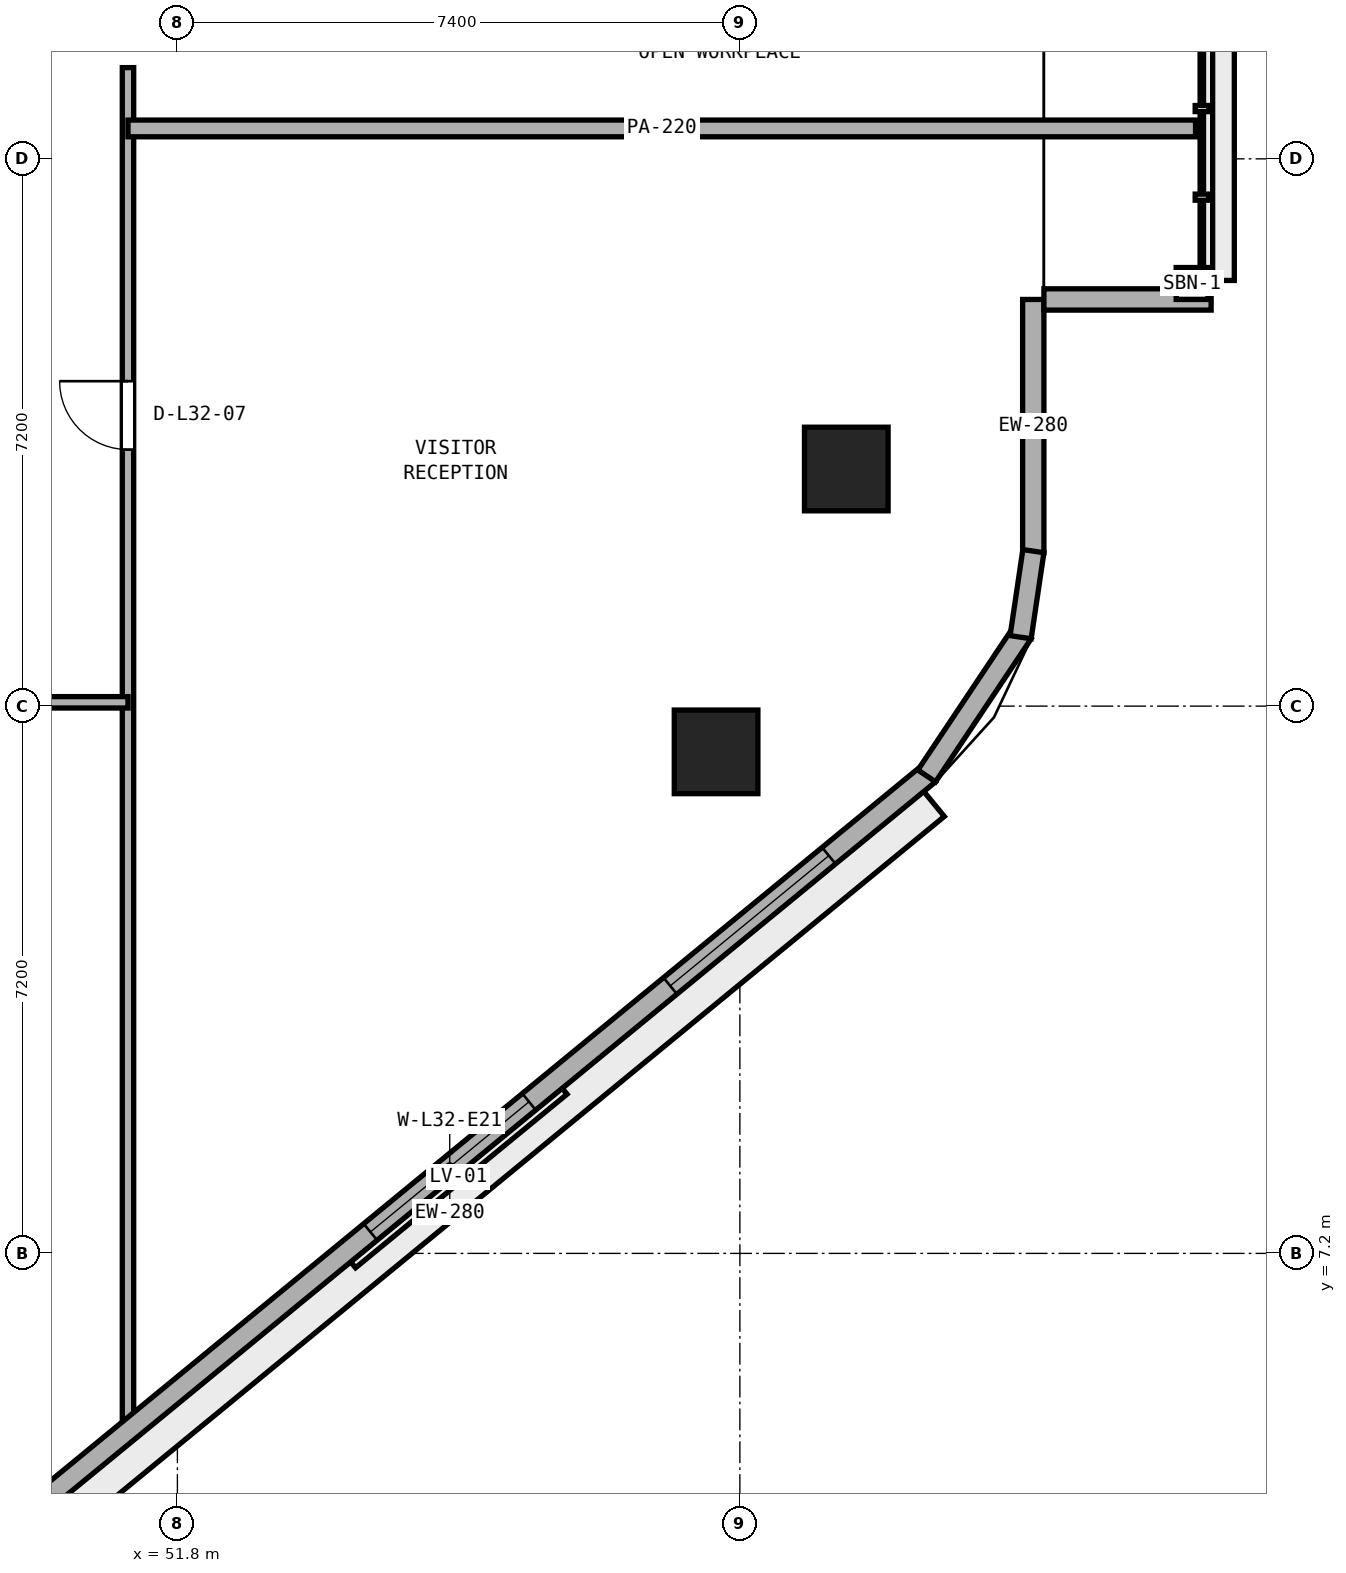
"""IFC4 building model, lengths in metres.
Left out: names, types, materials, properties, quantities, classifications, styles, units other than length and angle.
Written with IfcOpenShell. Run it as: python <this file> out.ifc"""

import sys

from ifc_helpers import new_model, si_unit, direction, frame, frame_2d, origin, origin_2d, place, context, subcontext, project, spatial, rectangle, extrude, element, fill, save


model = new_model("IFC4")
c1 = context("Model", 3, precision=1e-05, world=origin(), true_north=direction((0.0, 1.0)))
c2 = subcontext(c1, "Body", "Model", "MODEL_VIEW")
j1 = project(units=[si_unit("LENGTHUNIT", "METRE"), si_unit("PLANEANGLEUNIT", "RADIAN")], contexts=[c1])
p1 = place(None, origin())
s1 = spatial("IfcSite", under=j1, at=p1, CompositionType="ELEMENT")
p2 = place(p1, origin())
s2 = spatial("IfcBuilding", under=s1, at=p2, CompositionType="ELEMENT")
p3 = place(p2, frame((0.0, 0.0, 128.8)))
s3 = spatial("IfcBuildingStorey", under=s2, at=p3, CompositionType="ELEMENT", Elevation=128.8)
for number, where, z_axis, x_axis in (
    (1, (58.887, 13.798, 0.0), (0.0, 0.0, 1.0), (1.0, 0.0, 0.0)),
    (2, (60.6, 17.519, 0.0), (0.0, 0.0, 1.0), (1.0, 0.0, 0.0)),
):
    element("IfcColumn", number, at=place(p3, frame(where, z_axis=z_axis, x_axis=x_axis)), inside=s3, PredefinedType="COLUMN", context=c2, shape_type="SweptSolid", body=[
        extrude(rectangle(XDim=1.1, YDim=1.1, at=origin_2d()), origin(), (0.0, 0.0, 1.0), 3.8),
    ])
p4 = place(p3, frame((51.15, 4.823, 0.0), z_axis=(0.0, 0.0, 1.0), x_axis=(0.0, 1.0, 0.0)))
e3 = element("IfcWall", 3, at=p4, inside=s3, PredefinedType="PARTITIONING", context=c2, shape_type="SweptSolid", body=[
    extrude(rectangle(XDim=17.978, YDim=0.15, at=frame_2d((8.989, 0.0))), origin(), (0.0, 0.0, 1.0), 3.54),
])
p5 = place(p4, frame((12.952, 0.0, 0.0)))
e4 = element("IfcOpeningElement", 4, at=p5, cuts=e3, PredefinedType="OPENING", context=c2, shape_type="SweptSolid", body=[
    extrude(rectangle(XDim=0.9, YDim=2.1, at=frame_2d((0.45, 1.05))), frame((0.0, 0.085, 0.0), z_axis=(0.0, -1.0, 0.0), x_axis=(1.0, 0.0, 0.0)), (0.0, 0.0, 1.0), 0.17),
])
p6 = place(p3, frame((22.85, 14.45, 0.0), z_axis=(0.0, 0.0, 1.0), x_axis=(1.0, 0.0, 0.0)))
e5 = element("IfcWall", 5, at=p6, inside=s3, PredefinedType="PARTITIONING", context=c2, shape_type="SweptSolid", body=[
    extrude(rectangle(XDim=28.3, YDim=0.15, at=frame_2d((14.15, 0.0))), origin(), (0.0, 0.0, 1.0), 3.54),
])
p7 = place(p6, frame((13.65, 0.0, 0.0)))
e6 = element("IfcOpeningElement", 6, at=p7, cuts=e5, PredefinedType="OPENING", context=c2, shape_type="SweptSolid", body=[
    extrude(rectangle(XDim=1.0, YDim=2.12, at=frame_2d((0.5, 1.06))), frame((0.0, 0.085, 0.0), z_axis=(0.0, -1.0, 0.0), x_axis=(1.0, 0.0, 0.0)), (0.0, 0.0, 1.0), 0.17),
])
p8 = place(p3, frame((51.15, 22.0, 0.0), z_axis=(0.0, 0.0, 1.0), x_axis=(1.0, 0.0, 0.0)))
e7 = element("IfcWall", 7, at=p8, inside=s3, PredefinedType="PARTITIONING", context=c2, shape_type="SweptSolid", body=[
    extrude(rectangle(XDim=14.045, YDim=0.22, at=frame_2d((7.022, 0.0))), origin(), (0.0, 0.0, 1.0), 3.54),
])
p9 = place(p3, frame((49.08, 3.164, 0.0), z_axis=(0.0, 0.0, 1.0), x_axis=(0.772937830186, 0.634481765433, 0.0)))
e8 = element("IfcWall", 8, at=p9, inside=s3, PredefinedType="STANDARD", context=c2, shape_type="SweptSolid", body=[
    extrude(rectangle(XDim=16.309, YDim=0.28, at=frame_2d((8.154, 0.0))), origin(), (0.0, 0.0, 1.0), 3.54),
])
p10 = place(p9, frame((6.804, 0.0, 0.9)))
e9 = element("IfcOpeningElement", 9, at=p10, cuts=e8, PredefinedType="OPENING", context=c2, shape_type="SweptSolid", body=[
    extrude(rectangle(XDim=2.7, YDim=1.75, at=frame_2d((1.35, 0.875))), frame((0.0, 0.15, 0.0), z_axis=(0.0, -1.0, 0.0), x_axis=(1.0, 0.0, 0.0)), (0.0, 0.0, 1.0), 0.3),
])
p11 = place(p9, frame((11.907, 0.0, 0.9)))
e10 = element("IfcOpeningElement", 10, at=p11, cuts=e8, PredefinedType="OPENING", context=c2, shape_type="SweptSolid", body=[
    extrude(rectangle(XDim=2.7, YDim=1.75, at=frame_2d((1.35, 0.875))), frame((0.0, 0.15, 0.0), z_axis=(0.0, -1.0, 0.0), x_axis=(1.0, 0.0, 0.0)), (0.0, 0.0, 1.0), 0.3),
])
p12 = place(p3, frame((63.06, 16.418, 0.0), z_axis=(0.0, 0.0, 1.0), x_axis=(0.0, 1.0, 0.0)))
e11 = element("IfcWall", 11, at=p12, inside=s3, PredefinedType="STANDARD", context=c2, shape_type="SweptSolid", body=[
    extrude(rectangle(XDim=3.332, YDim=0.28, at=frame_2d((1.666, 0.0))), origin(), (0.0, 0.0, 1.0), 3.54),
])
p13 = place(p3, frame((61.658, 13.482, 0.0), z_axis=(0.0, 0.0, 1.0), x_axis=(0.555521224344, 0.831502356764, 0.0)))
e12 = element("IfcWall", 12, at=p13, inside=s3, PredefinedType="STANDARD", context=c2, shape_type="SweptSolid", body=[
    extrude(rectangle(XDim=2.264, YDim=0.28, at=frame_2d((1.132, 0.0))), origin(), (0.0, 0.0, 1.0), 3.54),
])
p14 = place(p3, frame((62.894, 15.307, 0.0), z_axis=(0.0, 0.0, 1.0), x_axis=(0.146796104284, 0.989166772474, 0.0)))
e13 = element("IfcWall", 13, at=p14, inside=s3, PredefinedType="STANDARD", context=c2, shape_type="SweptSolid", body=[
    extrude(rectangle(XDim=1.144, YDim=0.28, at=frame_2d((0.572, 0.0))), origin(), (0.0, 0.0, 1.0), 3.54),
])
p15 = place(p3, frame((63.2, 19.75, 0.0), z_axis=(0.0, 0.0, 1.0), x_axis=(1.0, 0.0, 0.0)))
e14 = element("IfcWall", 14, at=p15, inside=s3, PredefinedType="STANDARD", context=c2, shape_type="SweptSolid", body=[
    extrude(rectangle(XDim=2.2, YDim=0.28, at=frame_2d((1.1, 0.0))), origin(), (0.0, 0.0, 1.0), 2.847),
])
p16 = place(p5, origin())
e15 = element("IfcDoor", 15, at=p16, inside=s3, OperationType="SINGLE_SWING_RIGHT", PredefinedType="DOOR", context=c2, shape_type="SweptSolid", body=[
    extrude(rectangle(XDim=0.9, YDim=2.1, at=frame_2d((0.45, 1.05))), frame((0.0, 0.025, 0.0), z_axis=(0.0, -1.0, 0.0), x_axis=(1.0, 0.0, 0.0)), (0.0, 0.0, 1.0), 0.05),
])
fill(e4, e15)
p17 = place(p10, origin())
e16 = element("IfcWindow", 16, at=p17, inside=s3, PartitioningType="SINGLE_PANEL", PredefinedType="WINDOW", context=c2, shape_type="SweptSolid", body=[
    extrude(rectangle(XDim=2.7, YDim=1.75, at=frame_2d((1.35, 0.875))), frame((0.0, 0.03, 0.0), z_axis=(0.0, -1.0, 0.0), x_axis=(1.0, 0.0, 0.0)), (0.0, 0.0, 1.0), 0.06),
])
fill(e9, e16)
p18 = place(p11, origin())
e17 = element("IfcWindow", 17, at=p18, inside=s3, PartitioningType="SINGLE_PANEL", PredefinedType="WINDOW", context=c2, shape_type="SweptSolid", body=[
    extrude(rectangle(XDim=2.7, YDim=1.75, at=frame_2d((1.35, 0.875))), frame((0.0, 0.03, 0.0), z_axis=(0.0, -1.0, 0.0), x_axis=(1.0, 0.0, 0.0)), (0.0, 0.0, 1.0), 0.06),
])
fill(e10, e17)
save(model, sys.argv[1])
